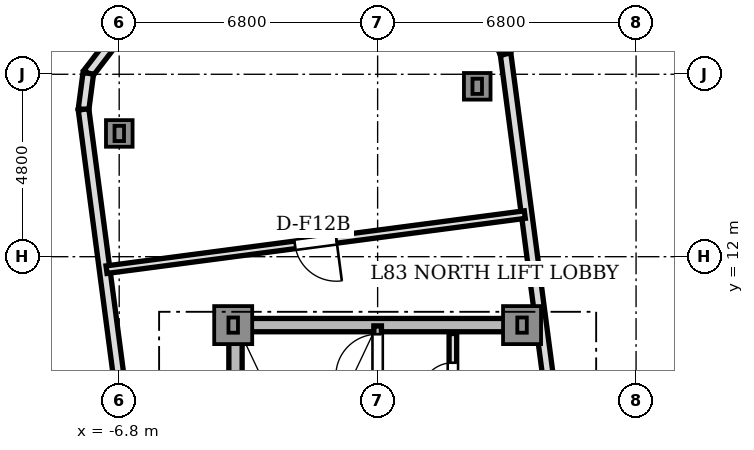
"""IFC4 building model, lengths in metres.
Left out: names, types, materials, properties, quantities, classifications, styles, units other than length and angle.
Written with IfcOpenShell. Run it as: python <this file> out.ifc"""

import sys

from ifc_helpers import new_model, si_unit, direction, frame, frame_2d, origin, origin_2d, place, context, subcontext, project, spatial, polyline, rectangle, i_section, outline, extrude, source, transform, mapped, element, fill, save


model = new_model("IFC4")
c1 = context("Model", 3, precision=1e-05, world=origin(), true_north=direction((0.0, 1.0)))
c2 = subcontext(c1, "Body", "Model", "MODEL_VIEW")
j1 = project(units=[si_unit("LENGTHUNIT", "METRE"), si_unit("PLANEANGLEUNIT", "RADIAN")], contexts=[c1])
p1 = place(None, origin())
s1 = spatial("IfcSite", under=j1, at=p1, CompositionType="ELEMENT")
p2 = place(p1, origin())
s2 = spatial("IfcBuilding", under=s1, at=p2, CompositionType="ELEMENT")
p3 = place(p2, frame((0.0, 0.0, 300.3)))
s3 = spatial("IfcBuildingStorey", under=s2, at=p3, CompositionType="ELEMENT", Elevation=300.3)
p4 = place(p3, frame((-3.55, 10.2, 0.0), z_axis=(0.0, 0.0, 1.0), x_axis=(1.0, 0.0, 0.0)))
e1 = element("IfcWall", 1, at=p4, inside=s3, PredefinedType="SHEAR", context=c2, shape_type="SweptSolid", body=[
    extrude(rectangle(XDim=7.1, YDim=0.35, at=frame_2d((3.55, 0.0))), origin(), (0.0, 0.0, 1.0), 4.25),
])
p5 = place(p3, frame((-3.74, 2.85, 0.0), z_axis=(0.0, 0.0, 1.0), x_axis=(0.0, 1.0, 0.0)))
e2 = element("IfcWall", 2, at=p5, inside=s3, PredefinedType="SHEAR", context=c2, shape_type="SweptSolid", body=[
    extrude(rectangle(XDim=6.9, YDim=0.35, at=frame_2d((3.45, 0.0))), origin(), (0.0, 0.0, 1.0), 4.25),
])
m1 = source(origin(), c2, "Body", "SweptSolid", [
    extrude(rectangle(XDim=1.0, YDim=1.0, at=origin_2d()), origin(), (0.0, 0.0, 1.0), 4.25),
])
for number, where, z_axis, x_axis in (
    (3, (-3.8, 10.2, 0.0), (0.0, 0.0, 1.0), (1.0, 0.0, 0.0)),
    (4, (3.8, 10.2, 0.0), (0.0, 0.0, 1.0), (1.0, 0.0, 0.0)),
):
    element("IfcColumn", number, at=place(p3, frame(where, z_axis=z_axis, x_axis=x_axis)), inside=s3, PredefinedType="COLUMN", context=c2, shape_type="MappedRepresentation", body=[
        mapped(m1, transform((0.0, 0.0, 0.0), scale=1.0)),
    ])
m2 = source(origin(), c2, "Body", "SweptSolid", [
    extrude(rectangle(XDim=0.7, YDim=0.7, at=origin_2d()), origin(), (0.0, 0.0, 1.0), 4.25),
])
for number, where, z_axis, x_axis in (
    (5, (2.621, 16.483, 0.0), (0.0, 0.0, 1.0), (1.0, 0.0, 0.0)),
    (6, (-6.798, 15.243, 0.0), (0.0, 0.0, 1.0), (1.0, 0.0, 0.0)),
):
    element("IfcColumn", number, at=place(p3, frame(where, z_axis=z_axis, x_axis=x_axis)), inside=s3, PredefinedType="COLUMN", context=c2, shape_type="MappedRepresentation", body=[
        mapped(m2, transform((0.0, 0.0, 0.0), scale=1.0)),
    ])
m3 = source(origin(), c2, "Body", "SweptSolid", [
    extrude(i_section(OverallWidth=0.25, OverallDepth=0.4, WebThickness=0.013, FlangeThickness=0.013, FilletRadius=0.014, at=origin_2d()), origin(), (0.0, 0.0, 1.0), 5.959),
])
p6 = place(p3, frame((-3.8, 10.2, 4.25), z_axis=(0.0, 0.0, 1.0), x_axis=(1.0, 0.0, 0.0)))
e7 = element("IfcColumn", 7, at=p6, inside=s3, PredefinedType="COLUMN", context=c2, shape_type="MappedRepresentation", body=[
    mapped(m3, transform((0.0, 0.0, 0.0), scale=1.0)),
])
m4 = source(origin(), c2, "Body", "SweptSolid", [
    extrude(i_section(OverallWidth=0.25, OverallDepth=0.4, WebThickness=0.013, FlangeThickness=0.013, FilletRadius=0.014, at=origin_2d()), origin(), (0.0, 0.0, 1.0), 8.953),
])
p7 = place(p3, frame((3.8, 10.2, 4.25), z_axis=(0.0, 0.0, 1.0), x_axis=(1.0, 0.0, 0.0)))
e8 = element("IfcColumn", 8, at=p7, inside=s3, PredefinedType="COLUMN", context=c2, shape_type="MappedRepresentation", body=[
    mapped(m4, transform((0.0, 0.0, 0.0), scale=1.0)),
])
m5 = source(origin(), c2, "Body", "SweptSolid", [
    extrude(i_section(OverallWidth=0.25, OverallDepth=0.4, WebThickness=0.013, FlangeThickness=0.013, FilletRadius=0.014, at=origin_2d()), origin(), (0.0, 0.0, 1.0), 8.489),
])
p8 = place(p3, frame((2.621, 16.483, 4.25), z_axis=(0.0, 0.0, 1.0), x_axis=(1.0, 0.0, 0.0)))
e9 = element("IfcColumn", 9, at=p8, inside=s3, PredefinedType="COLUMN", context=c2, shape_type="MappedRepresentation", body=[
    mapped(m5, transform((0.0, 0.0, 0.0), scale=1.0)),
])
m6 = source(origin(), c2, "Body", "SweptSolid", [
    extrude(i_section(OverallWidth=0.25, OverallDepth=0.4, WebThickness=0.013, FlangeThickness=0.013, FilletRadius=0.014, at=origin_2d()), origin(), (0.0, 0.0, 1.0), 4.778),
])
p9 = place(p3, frame((-6.798, 15.243, 4.25), z_axis=(0.0, 0.0, 1.0), x_axis=(1.0, 0.0, 0.0)))
e10 = element("IfcColumn", 10, at=p9, inside=s3, PredefinedType="COLUMN", context=c2, shape_type="MappedRepresentation", body=[
    mapped(m6, transform((0.0, 0.0, 0.0), scale=1.0)),
])
p10 = place(p3, frame((4.821, 6.283, 0.0), z_axis=(0.0, 0.0, 1.0), x_axis=(-0.130521347626, 0.991445499165, 0.0)))
e11 = element("IfcWall", 11, at=p10, inside=s3, PredefinedType="SOLIDWALL", context=c2, shape_type="SweptSolid", body=[
    extrude(outline(polyline([(0.0, 0.0), (11.15, 0.0), (11.15, 13.026), (0.0, 13.599), (0.0, 0.0)])), frame((0.0, 0.14, 0.0), z_axis=(0.0, -1.0, 0.0), x_axis=(1.0, 0.0, 0.0)), (0.0, 0.0, 1.0), 0.28),
])
p11 = place(p3, frame((3.366, 17.338, 0.0), z_axis=(0.0, 0.0, 1.0), x_axis=(-0.382659506909, 0.923889442397, 0.0)))
e12 = element("IfcWall", 12, at=p11, inside=s3, PredefinedType="SOLIDWALL", context=c2, shape_type="SweptSolid", body=[
    extrude(outline(polyline([(0.0, 0.0), (0.958, 0.0), (0.958, 12.881), (0.0, 13.026), (0.0, 0.0)])), frame((0.0, 0.14, 0.0), z_axis=(0.0, -1.0, 0.0), x_axis=(1.0, 0.0, 0.0)), (0.0, 0.0, 1.0), 0.28),
])
p12 = place(p3, frame((-7.031, 17.585, 0.0), z_axis=(0.0, 0.0, 1.0), x_axis=(-0.60861352168, -0.793466811674, 0.0)))
e13 = element("IfcWall", 13, at=p12, inside=s3, PredefinedType="SOLIDWALL", context=c2, shape_type="SweptSolid", body=[
    extrude(outline(polyline([(0.0, 0.0), (0.958, 0.0), (0.958, 8.701), (0.0, 8.931), (0.0, 0.0)])), frame((0.0, 0.14, 0.0), z_axis=(0.0, -1.0, 0.0), x_axis=(1.0, 0.0, 0.0)), (0.0, 0.0, 1.0), 0.28),
])
p13 = place(p3, frame((-7.613, 16.825, 0.0), z_axis=(0.0, 0.0, 1.0), x_axis=(-0.130527053476, -0.991444747987, 0.0)))
e14 = element("IfcWall", 14, at=p13, inside=s3, PredefinedType="SOLIDWALL", context=c2, shape_type="SweptSolid", body=[
    extrude(outline(polyline([(0.0, 0.0), (0.958, 0.0), (0.958, 8.652), (0.0, 8.701), (0.0, 0.0)])), frame((0.0, 0.14, 0.0), z_axis=(0.0, -1.0, 0.0), x_axis=(1.0, 0.0, 0.0)), (0.0, 0.0, 1.0), 0.28),
])
p14 = place(p3, frame((-7.738, 15.876, 0.0), z_axis=(0.0, 0.0, 1.0), x_axis=(0.130521347626, -0.991445499165, 0.0)))
e15 = element("IfcWall", 15, at=p14, inside=s3, PredefinedType="SOLIDWALL", context=c2, shape_type="SweptSolid", body=[
    extrude(outline(polyline([(0.0, 0.0), (11.15, 0.0), (11.15, 9.225), (0.0, 8.652), (0.0, 0.0)])), frame((0.0, 0.14, 0.0), z_axis=(0.0, -1.0, 0.0), x_axis=(1.0, 0.0, 0.0)), (0.0, 0.0, 1.0), 0.28),
])
p15 = place(p3, frame((0.0, 2.5, 0.0), z_axis=(0.0, 0.0, 1.0), x_axis=(0.0, 1.0, 0.0)))
e16 = element("IfcWall", 16, at=p15, inside=s3, PredefinedType="SOLIDWALL", context=c2, shape_type="SweptSolid", body=[
    extrude(rectangle(XDim=7.68, YDim=0.2, at=frame_2d((3.84, 0.0))), origin(), (0.0, 0.0, 1.0), 4.15),
])
p16 = place(p15, frame((6.36, 0.0, 0.0)))
e17 = element("IfcOpeningElement", 17, at=p16, cuts=e16, PredefinedType="OPENING", context=c2, shape_type="SweptSolid", body=[
    extrude(rectangle(XDim=1.1, YDim=2.15, at=frame_2d((0.55, 1.075))), frame((0.0, 0.11, 0.0), z_axis=(0.0, -1.0, 0.0), x_axis=(1.0, 0.0, 0.0)), (0.0, 0.0, 1.0), 0.22),
])
p17 = place(p3, frame((1.98, 5.32, 0.0), z_axis=(0.0, 0.0, 1.0), x_axis=(0.0, 1.0, 0.0)))
e18 = element("IfcWall", 18, at=p17, inside=s3, PredefinedType="SOLIDWALL", context=c2, shape_type="SweptSolid", body=[
    extrude(rectangle(XDim=4.66, YDim=0.2, at=frame_2d((2.33, 0.0))), origin(), (0.0, 0.0, 1.0), 3.7),
])
p18 = place(p17, frame((3.04, 0.0, 0.0)))
e19 = element("IfcOpeningElement", 19, at=p18, cuts=e18, PredefinedType="OPENING", context=c2, shape_type="SweptSolid", body=[
    extrude(rectangle(XDim=0.85, YDim=2.1, at=frame_2d((0.425, 1.05))), frame((0.0, 0.11, 0.0), z_axis=(0.0, -1.0, 0.0), x_axis=(1.0, 0.0, 0.0)), (0.0, 0.0, 1.0), 0.22),
])
p19 = place(p3, frame((3.872, 13.108, 0.0), z_axis=(0.0, 0.0, 1.0), x_axis=(-0.991443437127, -0.130537009991, 0.0)))
e20 = element("IfcWall", 20, at=p19, inside=s3, PredefinedType="SOLIDWALL", context=c2, shape_type="SweptSolid", body=[
    extrude(rectangle(XDim=11.1, YDim=0.2, at=frame_2d((5.55, 0.0))), origin(), (0.0, 0.0, 1.0), 3.7),
])
p20 = place(p19, frame((5.0, 0.0, 0.0)))
e21 = element("IfcOpeningElement", 21, at=p20, cuts=e20, PredefinedType="OPENING", context=c2, shape_type="SweptSolid", body=[
    extrude(rectangle(XDim=1.1, YDim=2.15, at=frame_2d((0.55, 1.075))), frame((0.0, 0.11, 0.0), z_axis=(0.0, -1.0, 0.0), x_axis=(1.0, 0.0, 0.0)), (0.0, 0.0, 1.0), 0.22),
])
m7 = source(origin(), c2, "Body", "SweptSolid", [
    extrude(rectangle(XDim=1.1, YDim=0.05, at=origin_2d()), origin(), (0.0, 0.0, 1.0), 2.15),
])
p21 = place(p16, frame((0.55, 0.0, 0.0)))
e22 = element("IfcDoor", 22, at=p21, inside=s3, OperationType="SINGLE_SWING_LEFT", PredefinedType="DOOR", context=c2, shape_type="MappedRepresentation", body=[
    mapped(m7, transform((0.0, 0.0, 0.0), scale=1.0)),
])
fill(e17, e22)
m8 = source(origin(), c2, "Body", "SweptSolid", [
    extrude(rectangle(XDim=0.85, YDim=0.05, at=origin_2d()), origin(), (0.0, 0.0, 1.0), 2.1),
])
p22 = place(p18, frame((0.425, 0.0, 0.0)))
e23 = element("IfcDoor", 23, at=p22, inside=s3, OperationType="SINGLE_SWING_LEFT", PredefinedType="DOOR", context=c2, shape_type="MappedRepresentation", body=[
    mapped(m8, transform((0.0, 0.0, 0.0), scale=1.0)),
])
fill(e19, e23)
p23 = place(p20, frame((0.55, 0.0, 0.0)))
e24 = element("IfcDoor", 24, at=p23, inside=s3, OperationType="SINGLE_SWING_LEFT", PredefinedType="DOOR", context=c2, shape_type="MappedRepresentation", body=[
    mapped(m7, transform((0.0, 0.0, 0.0), scale=1.0)),
])
fill(e21, e24)
save(model, sys.argv[1])
